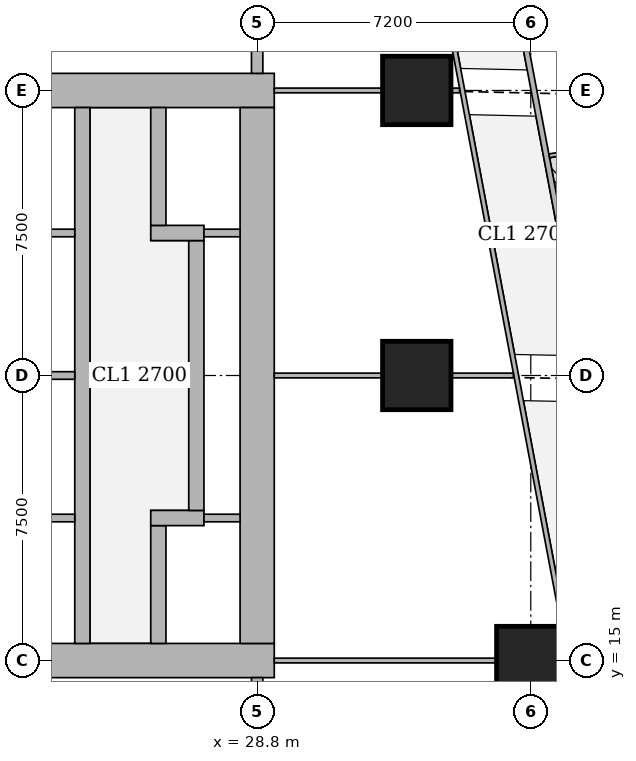
"""IFC4 building model, lengths in metres.
Left out: names, types, materials, properties, quantities, classifications, styles, units other than length and angle.
Written with IfcOpenShell. Run it as: python <this file> out.ifc"""

import sys

from ifc_helpers import new_model, si_unit, direction, frame, frame_2d, origin, origin_2d, place, context, subcontext, project, spatial, rectangle, extrude, element, fill, save


model = new_model("IFC4")
c1 = context("Model", 3, precision=1e-05, world=origin(), true_north=direction((0.0, 1.0)))
c2 = subcontext(c1, "Body", "Model", "MODEL_VIEW")
j1 = project(units=[si_unit("LENGTHUNIT", "METRE"), si_unit("PLANEANGLEUNIT", "RADIAN")], contexts=[c1])
p1 = place(None, origin())
s1 = spatial("IfcSite", under=j1, at=p1, CompositionType="ELEMENT")
p2 = place(p1, origin())
s2 = spatial("IfcBuilding", under=s1, at=p2, CompositionType="ELEMENT")
p3 = place(p2, frame((0.0, 0.0, 42.5)))
s3 = spatial("IfcBuildingStorey", under=s2, at=p3, CompositionType="ELEMENT", Elevation=42.5)
for number, where, z_axis, x_axis in (
    (1, (36.0, 15.0, 0.0), (0.0, 0.0, 1.0), (1.0, 0.0, 0.0)),
    (2, (33.0, 22.5, 0.0), (0.0, 0.0, 1.0), (1.0, 0.0, 0.0)),
    (3, (33.0, 30.0, 0.0), (0.0, 0.0, 1.0), (1.0, 0.0, 0.0)),
):
    element("IfcColumn", number, at=place(p3, frame(where, z_axis=z_axis, x_axis=x_axis)), inside=s3, PredefinedType="COLUMN", context=c2, shape_type="SweptSolid", body=[
        extrude(rectangle(XDim=1.8, YDim=1.8, at=origin_2d()), origin(), (0.0, 0.0, 1.0), 3.75),
    ])
p4 = place(p3, frame((13.95, 15.0, 0.0), z_axis=(0.0, 0.0, 1.0), x_axis=(1.0, 0.0, 0.0)))
e4 = element("IfcWall", 4, at=p4, inside=s3, PredefinedType="SHEAR", context=c2, shape_type="SweptSolid", body=[
    extrude(rectangle(XDim=15.3, YDim=0.9, at=frame_2d((7.65, 0.0))), origin(), (0.0, 0.0, 1.0), 3.75),
])
p5 = place(p4, frame((4.45, 0.0, 0.0)))
e5 = element("IfcOpeningElement", 5, at=p5, cuts=e4, PredefinedType="OPENING", context=c2, shape_type="SweptSolid", body=[
    extrude(rectangle(XDim=1.8, YDim=2.1, at=frame_2d((0.9, 1.05))), frame((0.0, 0.46, 0.0), z_axis=(0.0, -1.0, 0.0), x_axis=(1.0, 0.0, 0.0)), (0.0, 0.0, 1.0), 0.92),
])
p6 = place(p4, frame((10.7, 0.0, 0.0)))
e6 = element("IfcOpeningElement", 6, at=p6, cuts=e4, PredefinedType="OPENING", context=c2, shape_type="SweptSolid", body=[
    extrude(rectangle(XDim=1.1, YDim=2.1, at=frame_2d((0.55, 1.05))), frame((0.0, 0.46, 0.0), z_axis=(0.0, -1.0, 0.0), x_axis=(1.0, 0.0, 0.0)), (0.0, 0.0, 1.0), 0.92),
])
p7 = place(p3, frame((13.95, 30.0, 0.0), z_axis=(0.0, 0.0, 1.0), x_axis=(1.0, 0.0, 0.0)))
e7 = element("IfcWall", 7, at=p7, inside=s3, PredefinedType="SHEAR", context=c2, shape_type="SweptSolid", body=[
    extrude(rectangle(XDim=15.3, YDim=0.9, at=frame_2d((7.65, 0.0))), origin(), (0.0, 0.0, 1.0), 3.75),
])
p8 = place(p7, frame((4.45, 0.0, 0.0)))
e8 = element("IfcOpeningElement", 8, at=p8, cuts=e7, PredefinedType="OPENING", context=c2, shape_type="SweptSolid", body=[
    extrude(rectangle(XDim=1.8, YDim=2.1, at=frame_2d((0.9, 1.05))), frame((0.0, 0.46, 0.0), z_axis=(0.0, -1.0, 0.0), x_axis=(1.0, 0.0, 0.0)), (0.0, 0.0, 1.0), 0.92),
])
p9 = place(p7, frame((10.7, 0.0, 0.0)))
e9 = element("IfcOpeningElement", 9, at=p9, cuts=e7, PredefinedType="OPENING", context=c2, shape_type="SweptSolid", body=[
    extrude(rectangle(XDim=1.1, YDim=2.1, at=frame_2d((0.55, 1.05))), frame((0.0, 0.46, 0.0), z_axis=(0.0, -1.0, 0.0), x_axis=(1.0, 0.0, 0.0)), (0.0, 0.0, 1.0), 0.92),
])
p10 = place(p3, frame((28.8, 15.45, 0.0), z_axis=(0.0, 0.0, 1.0), x_axis=(0.0, 1.0, 0.0)))
e10 = element("IfcWall", 10, at=p10, inside=s3, PredefinedType="SHEAR", context=c2, shape_type="SweptSolid", body=[
    extrude(rectangle(XDim=14.1, YDim=0.9, at=frame_2d((7.05, 0.0))), origin(), (0.0, 0.0, 1.0), 3.75),
])
p11 = place(p3, frame((24.2, 15.45, 0.0), z_axis=(0.0, 0.0, 1.0), x_axis=(0.0, 1.0, 0.0)))
e11 = element("IfcWall", 11, at=p11, inside=s3, PredefinedType="SHEAR", context=c2, shape_type="SweptSolid", body=[
    extrude(rectangle(XDim=14.1, YDim=0.4, at=frame_2d((7.05, 0.0))), origin(), (0.0, 0.0, 1.0), 3.75),
])
p12 = place(p3, frame((26.2, 15.45, 0.0), z_axis=(0.0, 0.0, 1.0), x_axis=(0.0, 1.0, 0.0)))
e12 = element("IfcWall", 12, at=p12, inside=s3, PredefinedType="SHEAR", context=c2, shape_type="SweptSolid", body=[
    extrude(rectangle(XDim=3.1, YDim=0.4, at=frame_2d((1.55, 0.0))), origin(), (0.0, 0.0, 1.0), 3.75),
])
p13 = place(p12, frame((0.825, 0.0, 0.0)))
e13 = element("IfcOpeningElement", 13, at=p13, cuts=e12, PredefinedType="OPENING", context=c2, shape_type="SweptSolid", body=[
    extrude(rectangle(XDim=1.2, YDim=2.1, at=frame_2d((0.6, 1.05))), frame((0.0, 0.21, 0.0), z_axis=(0.0, -1.0, 0.0), x_axis=(1.0, 0.0, 0.0)), (0.0, 0.0, 1.0), 0.42),
])
p14 = place(p3, frame((26.0, 18.75, 0.0), z_axis=(0.0, 0.0, 1.0), x_axis=(1.0, 0.0, 0.0)))
e14 = element("IfcWall", 14, at=p14, inside=s3, PredefinedType="SHEAR", context=c2, shape_type="SweptSolid", body=[
    extrude(rectangle(XDim=1.4, YDim=0.4, at=frame_2d((0.7, 0.0))), origin(), (0.0, 0.0, 1.0), 3.75),
])
p15 = place(p3, frame((27.2, 18.95, 0.0), z_axis=(0.0, 0.0, 1.0), x_axis=(0.0, 1.0, 0.0)))
e15 = element("IfcWall", 15, at=p15, inside=s3, PredefinedType="SHEAR", context=c2, shape_type="SweptSolid", body=[
    extrude(rectangle(XDim=7.1, YDim=0.4, at=frame_2d((3.55, 0.0))), origin(), (0.0, 0.0, 1.0), 3.75),
])
p16 = place(p3, frame((26.0, 26.25, 0.0), z_axis=(0.0, 0.0, 1.0), x_axis=(1.0, 0.0, 0.0)))
e16 = element("IfcWall", 16, at=p16, inside=s3, PredefinedType="SHEAR", context=c2, shape_type="SweptSolid", body=[
    extrude(rectangle(XDim=1.4, YDim=0.4, at=frame_2d((0.7, 0.0))), origin(), (0.0, 0.0, 1.0), 3.75),
])
p17 = place(p3, frame((26.2, 26.45, 0.0), z_axis=(0.0, 0.0, 1.0), x_axis=(0.0, 1.0, 0.0)))
e17 = element("IfcWall", 17, at=p17, inside=s3, PredefinedType="SHEAR", context=c2, shape_type="SweptSolid", body=[
    extrude(rectangle(XDim=3.1, YDim=0.4, at=frame_2d((1.55, 0.0))), origin(), (0.0, 0.0, 1.0), 3.75),
])
p18 = place(p17, frame((1.075, 0.0, 0.0)))
e18 = element("IfcOpeningElement", 18, at=p18, cuts=e17, PredefinedType="OPENING", context=c2, shape_type="SweptSolid", body=[
    extrude(rectangle(XDim=1.2, YDim=2.1, at=frame_2d((0.6, 1.05))), frame((0.0, 0.21, 0.0), z_axis=(0.0, -1.0, 0.0), x_axis=(1.0, 0.0, 0.0)), (0.0, 0.0, 1.0), 0.42),
])
for number, where, z_axis, x_axis in (
    (19, (28.8, 10.35, 0.0), (0.0, 0.0, 1.0), (0.0, 1.0, 0.0)),
    (20, (28.8, 30.45, 0.0), (0.0, 0.0, 1.0), (0.0, 1.0, 0.0)),
):
    element("IfcWall", number, at=place(p3, frame(where, z_axis=z_axis, x_axis=x_axis)), inside=s3, PredefinedType="SHEAR", context=c2, shape_type="SweptSolid", body=[
        extrude(rectangle(XDim=4.2, YDim=0.3, at=frame_2d((2.1, 0.0))), origin(), (0.0, 0.0, 1.0), 3.75),
    ])
p19 = place(p3, frame((33.68, 42.723, 0.0), z_axis=(0.0, 0.0, 1.0), x_axis=(0.185624129307, -0.98262082342, 0.0)))
e21 = element("IfcWall", 21, at=p19, inside=s3, PredefinedType="SOLIDWALL", context=c2, shape_type="SweptSolid", body=[
    extrude(rectangle(XDim=41.051, YDim=0.15, at=frame_2d((20.526, 0.0))), origin(), (0.0, 0.0, 1.0), 2.5),
])
p20 = place(p19, frame((7.73, 0.0, 0.0)))
e22 = element("IfcOpeningElement", 22, at=p20, cuts=e21, PredefinedType="OPENING", context=c2, shape_type="SweptSolid", body=[
    extrude(rectangle(XDim=1.0, YDim=2.1, at=frame_2d((0.5, 1.05))), frame((0.0, 0.085, 0.0), z_axis=(0.0, -1.0, 0.0), x_axis=(1.0, 0.0, 0.0)), (0.0, 0.0, 1.0), 0.17),
])
p21 = place(p19, frame((12.307, 0.0, 0.0)))
e23 = element("IfcOpeningElement", 23, at=p21, cuts=e21, PredefinedType="OPENING", context=c2, shape_type="SweptSolid", body=[
    extrude(rectangle(XDim=1.0, YDim=2.1, at=frame_2d((0.5, 1.05))), frame((0.0, 0.085, 0.0), z_axis=(0.0, -1.0, 0.0), x_axis=(1.0, 0.0, 0.0)), (0.0, 0.0, 1.0), 0.17),
])
p22 = place(p19, frame((19.938, 0.0, 0.0)))
e24 = element("IfcOpeningElement", 24, at=p22, cuts=e21, PredefinedType="OPENING", context=c2, shape_type="SweptSolid", body=[
    extrude(rectangle(XDim=1.0, YDim=2.1, at=frame_2d((0.5, 1.05))), frame((0.0, 0.085, 0.0), z_axis=(0.0, -1.0, 0.0), x_axis=(1.0, 0.0, 0.0)), (0.0, 0.0, 1.0), 0.17),
])
p23 = place(p19, frame((32.193, 0.0, 0.0)))
e25 = element("IfcOpeningElement", 25, at=p23, cuts=e21, PredefinedType="OPENING", context=c2, shape_type="SweptSolid", body=[
    extrude(rectangle(XDim=1.0, YDim=2.1, at=frame_2d((0.5, 1.05))), frame((0.0, 0.085, 0.0), z_axis=(0.0, -1.0, 0.0), x_axis=(1.0, 0.0, 0.0)), (0.0, 0.0, 1.0), 0.17),
])
p24 = place(p3, frame((39.948, 28.933, 0.0), z_axis=(0.0, 0.0, 1.0), x_axis=(-0.982576058723, -0.185860939478, 0.0)))
e26 = element("IfcWall", 26, at=p24, inside=s3, PredefinedType="PARTITIONING", context=c2, shape_type="SweptSolid", body=[
    extrude(rectangle(XDim=3.524, YDim=0.1, at=frame_2d((1.762, 0.0))), origin(), (0.0, 0.0, 1.0), 3.5),
])
p25 = place(p3, frame((36.861, 15.913, 0.0), z_axis=(0.0, 0.0, 1.0), x_axis=(-0.185588307143, 0.982627589808, 0.0)))
e27 = element("IfcWall", 27, at=p25, inside=s3, PredefinedType="PARTITIONING", context=c2, shape_type="SweptSolid", body=[
    extrude(rectangle(XDim=19.005, YDim=0.125, at=frame_2d((9.502, 0.0))), origin(), (0.0, 0.0, 1.0), 2.5),
])
p26 = place(p25, frame((0.25, 0.0, 0.0)))
e28 = element("IfcOpeningElement", 28, at=p26, cuts=e27, PredefinedType="OPENING", context=c2, shape_type="SweptSolid", body=[
    extrude(rectangle(XDim=1.0, YDim=2.1, at=frame_2d((0.5, 1.05))), frame((0.0, 0.073, 0.0), z_axis=(0.0, -1.0, 0.0), x_axis=(1.0, 0.0, 0.0)), (0.0, 0.0, 1.0), 0.145),
])
p27 = place(p25, frame((7.527, 0.0, 0.0)))
e29 = element("IfcOpeningElement", 29, at=p27, cuts=e27, PredefinedType="OPENING", context=c2, shape_type="SweptSolid", body=[
    extrude(rectangle(XDim=1.0, YDim=2.1, at=frame_2d((0.5, 1.05))), frame((0.0, 0.073, 0.0), z_axis=(0.0, -1.0, 0.0), x_axis=(1.0, 0.0, 0.0)), (0.0, 0.0, 1.0), 0.145),
])
p28 = place(p25, frame((15.5, 0.0, 0.0)))
e30 = element("IfcOpeningElement", 30, at=p28, cuts=e27, PredefinedType="OPENING", context=c2, shape_type="SweptSolid", body=[
    extrude(rectangle(XDim=1.0, YDim=2.1, at=frame_2d((0.5, 1.05))), frame((0.0, 0.073, 0.0), z_axis=(0.0, -1.0, 0.0), x_axis=(1.0, 0.0, 0.0)), (0.0, 0.0, 1.0), 0.145),
])
p29 = place(p3, frame((29.25, 15.0, 0.0), z_axis=(0.0, 0.0, 1.0), x_axis=(1.0, 0.0, 0.0)))
e31 = element("IfcWall", 31, at=p29, inside=s3, PredefinedType="PARTITIONING", context=c2, shape_type="SweptSolid", body=[
    extrude(rectangle(XDim=5.849, YDim=0.125, at=frame_2d((2.925, 0.0))), origin(), (0.0, 0.0, 1.0), 3.5),
])
p30 = place(p3, frame((29.25, 22.5, 0.0), z_axis=(0.0, 0.0, 1.0), x_axis=(1.0, 0.0, 0.0)))
e32 = element("IfcWall", 32, at=p30, inside=s3, PredefinedType="PARTITIONING", context=c2, shape_type="SweptSolid", body=[
    extrude(rectangle(XDim=2.849, YDim=0.125, at=frame_2d((1.425, 0.0))), origin(), (0.0, 0.0, 1.0), 3.5),
])
p31 = place(p3, frame((33.901, 22.5, 0.0), z_axis=(0.0, 0.0, 1.0), x_axis=(1.0, 0.0, 0.0)))
e33 = element("IfcWall", 33, at=p31, inside=s3, PredefinedType="PARTITIONING", context=c2, shape_type="SweptSolid", body=[
    extrude(rectangle(XDim=1.641, YDim=0.125, at=frame_2d((0.821, 0.0))), origin(), (0.0, 0.0, 1.0), 2.5),
])
p32 = place(p3, frame((29.25, 30.0, 0.0), z_axis=(0.0, 0.0, 1.0), x_axis=(1.0, 0.0, 0.0)))
e34 = element("IfcWall", 34, at=p32, inside=s3, PredefinedType="PARTITIONING", context=c2, shape_type="SweptSolid", body=[
    extrude(rectangle(XDim=2.849, YDim=0.125, at=frame_2d((1.425, 0.0))), origin(), (0.0, 0.0, 1.0), 3.5),
])
p33 = place(p3, frame((33.901, 30.0, 0.0), z_axis=(0.0, 0.0, 1.0), x_axis=(1.0, 0.0, 0.0)))
e35 = element("IfcWall", 35, at=p33, inside=s3, PredefinedType="PARTITIONING", context=c2, shape_type="SweptSolid", body=[
    extrude(rectangle(XDim=0.224, YDim=0.125, at=frame_2d((0.112, 0.0))), origin(), (0.0, 0.0, 1.0), 2.5),
])
for number, where, z_axis, x_axis in (
    (36, (21.8, 18.75, 0.0), (0.0, 0.0, 1.0), (1.0, 0.0, 0.0)),
    (37, (21.8, 22.5, 0.0), (0.0, 0.0, 1.0), (1.0, 0.0, 0.0)),
    (38, (21.8, 26.25, 0.0), (0.0, 0.0, 1.0), (1.0, 0.0, 0.0)),
):
    element("IfcWall", number, at=place(p3, frame(where, z_axis=z_axis, x_axis=x_axis)), inside=s3, PredefinedType="SOLIDWALL", context=c2, shape_type="SweptSolid", body=[
        extrude(rectangle(XDim=2.2, YDim=0.2, at=frame_2d((1.1, 0.0))), origin(), (0.0, 0.0, 1.0), 3.5),
    ])
for number, where, z_axis, x_axis in (
    (39, (27.4, 18.75, 0.0), (0.0, 0.0, 1.0), (1.0, 0.0, 0.0)),
    (40, (27.4, 26.25, 0.0), (0.0, 0.0, 1.0), (1.0, 0.0, 0.0)),
):
    element("IfcWall", number, at=place(p3, frame(where, z_axis=z_axis, x_axis=x_axis)), inside=s3, PredefinedType="SOLIDWALL", context=c2, shape_type="SweptSolid", body=[
        extrude(rectangle(XDim=0.95, YDim=0.2, at=frame_2d((0.475, 0.0))), origin(), (0.0, 0.0, 1.0), 3.5),
    ])
p34 = place(p21, origin())
e41 = element("IfcDoor", 41, at=p34, inside=s3, OperationType="SINGLE_SWING_RIGHT", PredefinedType="DOOR", context=c2, shape_type="SweptSolid", body=[
    extrude(rectangle(XDim=1.0, YDim=2.1, at=frame_2d((0.5, 1.05))), frame((0.0, 0.025, 0.0), z_axis=(0.0, -1.0, 0.0), x_axis=(1.0, 0.0, 0.0)), (0.0, 0.0, 1.0), 0.05),
])
fill(e23, e41)
p35 = place(p26, origin())
e42 = element("IfcDoor", 42, at=p35, inside=s3, OperationType="SINGLE_SWING_LEFT", PredefinedType="DOOR", context=c2, shape_type="SweptSolid", body=[
    extrude(rectangle(XDim=1.0, YDim=2.1, at=frame_2d((0.5, 1.05))), frame((0.0, 0.025, 0.0), z_axis=(0.0, -1.0, 0.0), x_axis=(1.0, 0.0, 0.0)), (0.0, 0.0, 1.0), 0.05),
])
fill(e28, e42)
p36 = place(p27, origin())
e43 = element("IfcDoor", 43, at=p36, inside=s3, OperationType="SINGLE_SWING_LEFT", PredefinedType="DOOR", context=c2, shape_type="SweptSolid", body=[
    extrude(rectangle(XDim=1.0, YDim=2.1, at=frame_2d((0.5, 1.05))), frame((0.0, 0.025, 0.0), z_axis=(0.0, -1.0, 0.0), x_axis=(1.0, 0.0, 0.0)), (0.0, 0.0, 1.0), 0.05),
])
fill(e29, e43)
p37 = place(p6, origin())
e44 = element("IfcDoor", 44, at=p37, inside=s3, OperationType="SINGLE_SWING_LEFT", PredefinedType="DOOR", context=c2, shape_type="SweptSolid", body=[
    extrude(rectangle(XDim=1.1, YDim=2.1, at=frame_2d((0.55, 1.05))), frame((0.0, 0.025, 0.0), z_axis=(0.0, -1.0, 0.0), x_axis=(1.0, 0.0, 0.0)), (0.0, 0.0, 1.0), 0.05),
])
fill(e6, e44)
p38 = place(p9, origin())
e45 = element("IfcDoor", 45, at=p38, inside=s3, OperationType="SINGLE_SWING_LEFT", PredefinedType="DOOR", context=c2, shape_type="SweptSolid", body=[
    extrude(rectangle(XDim=1.1, YDim=2.1, at=frame_2d((0.55, 1.05))), frame((0.0, 0.025, 0.0), z_axis=(0.0, -1.0, 0.0), x_axis=(1.0, 0.0, 0.0)), (0.0, 0.0, 1.0), 0.05),
])
fill(e9, e45)
p39 = place(p13, origin())
e46 = element("IfcDoor", 46, at=p39, inside=s3, OperationType="DOUBLE_DOOR_SLIDING", PredefinedType="DOOR", context=c2, shape_type="SweptSolid", body=[
    extrude(rectangle(XDim=1.2, YDim=2.1, at=frame_2d((0.6, 1.05))), frame((0.0, 0.025, 0.0), z_axis=(0.0, -1.0, 0.0), x_axis=(1.0, 0.0, 0.0)), (0.0, 0.0, 1.0), 0.05),
])
fill(e13, e46)
p40 = place(p18, origin())
e47 = element("IfcDoor", 47, at=p40, inside=s3, OperationType="DOUBLE_DOOR_SLIDING", PredefinedType="DOOR", context=c2, shape_type="SweptSolid", body=[
    extrude(rectangle(XDim=1.2, YDim=2.1, at=frame_2d((0.6, 1.05))), frame((0.0, 0.025, 0.0), z_axis=(0.0, -1.0, 0.0), x_axis=(1.0, 0.0, 0.0)), (0.0, 0.0, 1.0), 0.05),
])
fill(e18, e47)
save(model, sys.argv[1])
